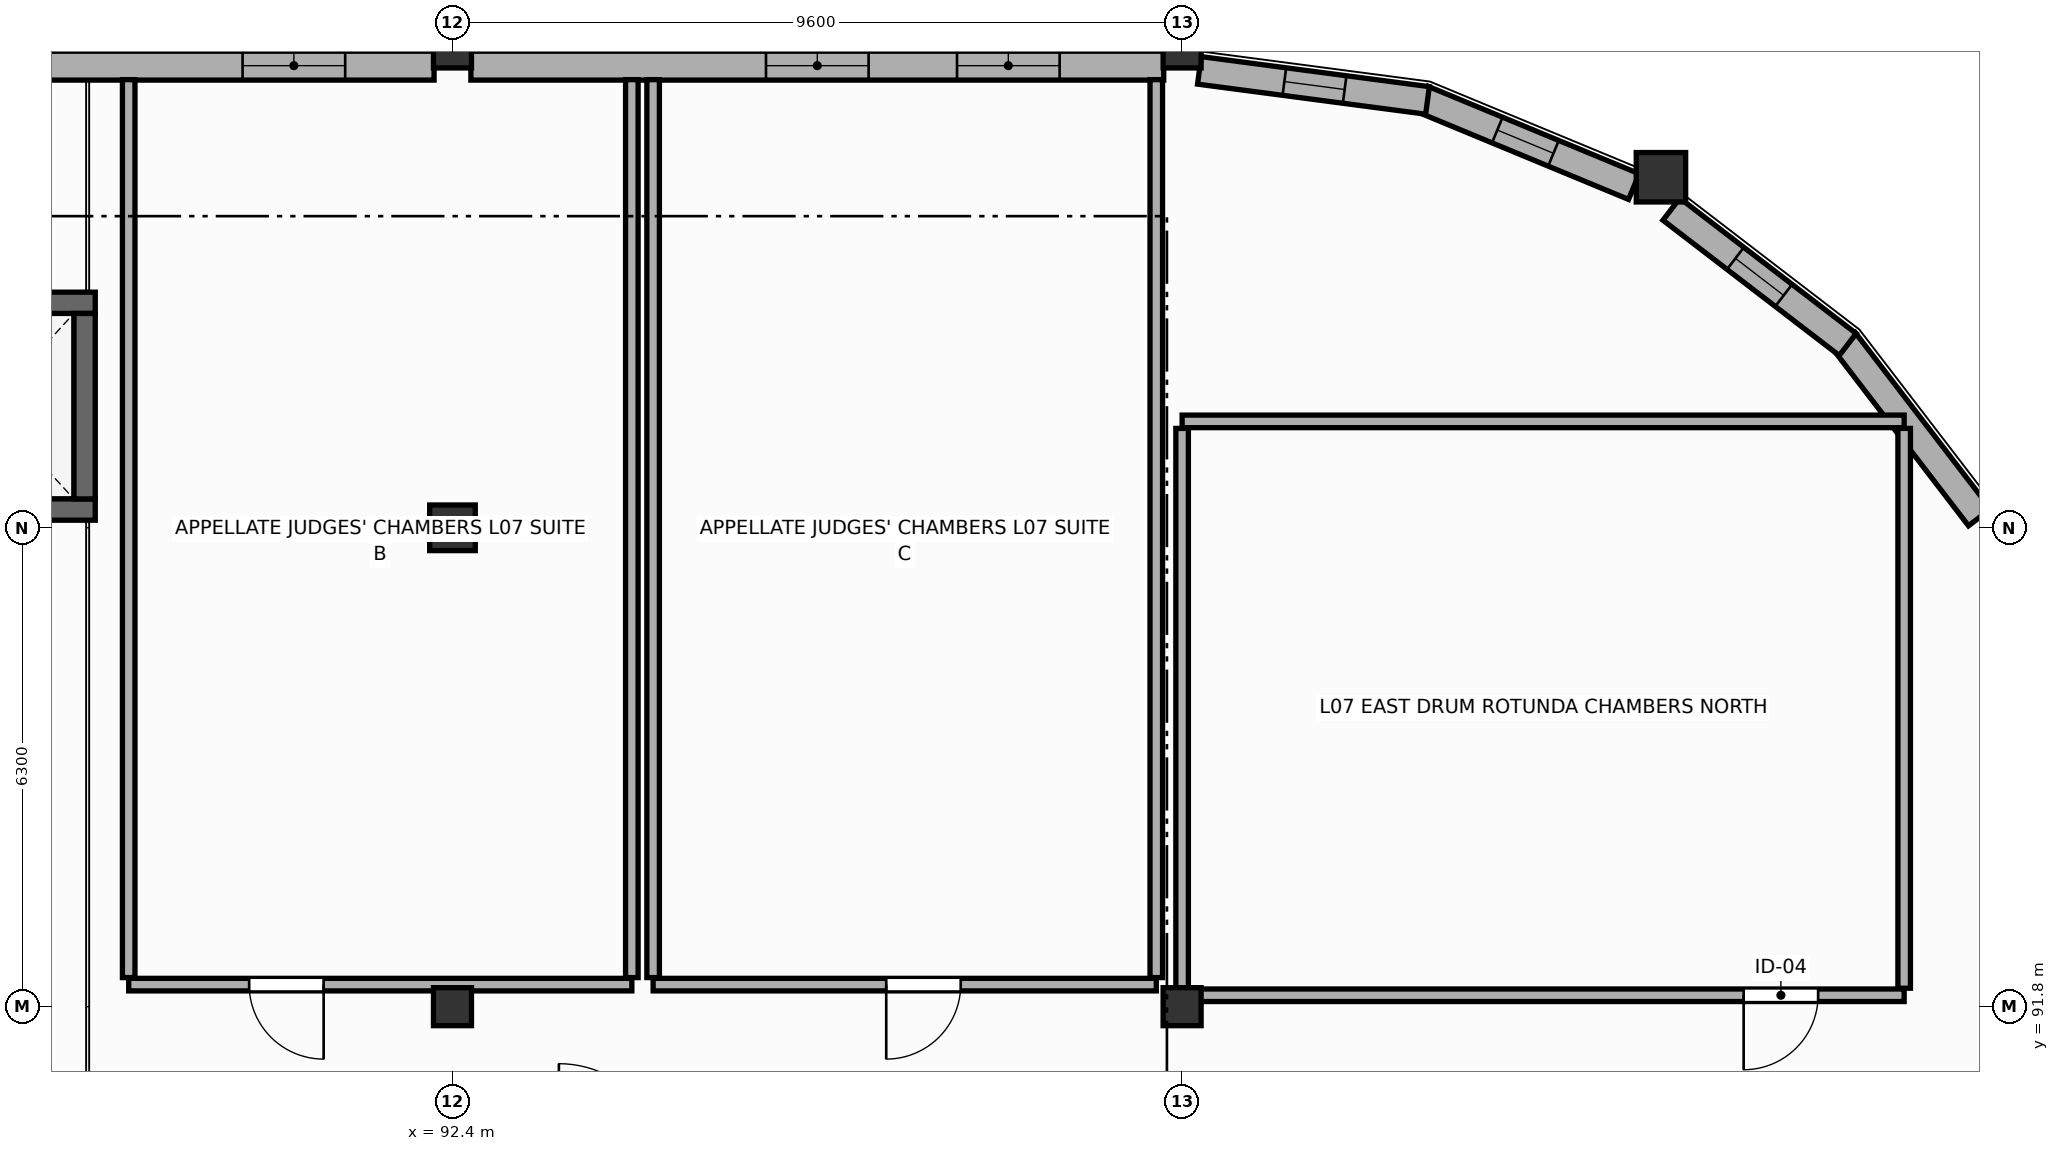
"""IFC4 building model, lengths in metres.
Left out: names, types, materials, properties, quantities, classifications, styles, units other than length and angle.
Written with IfcOpenShell. Run it as: python <this file> out.ifc"""

import sys

from ifc_helpers import new_model, si_unit, direction, frame, frame_2d, origin, origin_2d, place, context, subcontext, project, spatial, rectangle, circle, extrude, element, fill, save


model = new_model("IFC4")
c1 = context("Model", 3, precision=1e-05, world=origin(), true_north=direction((0.0, 1.0)))
c2 = subcontext(c1, "Body", "Model", "MODEL_VIEW")
j1 = project(units=[si_unit("LENGTHUNIT", "METRE"), si_unit("PLANEANGLEUNIT", "RADIAN")], contexts=[c1])
p1 = place(None, origin())
s1 = spatial("IfcSite", under=j1, at=p1, CompositionType="ELEMENT")
p2 = place(p1, origin())
s2 = spatial("IfcBuilding", under=s1, at=p2, CompositionType="ELEMENT")
p3 = place(p2, frame((0.0, 0.0, 27.0)))
s3 = spatial("IfcBuildingStorey", under=s2, at=p3, CompositionType="ELEMENT", Elevation=27.0)
for number, where, z_axis, x_axis in (
    (1, (92.4, 91.8, 0.0), (0.0, 0.0, 1.0), (1.0, 0.0, 0.0)),
    (2, (92.4, 104.4, 0.0), (0.0, 0.0, 1.0), (1.0, 0.0, 0.0)),
):
    element("IfcColumn", number, at=place(p3, frame(where, z_axis=z_axis, x_axis=x_axis)), inside=s3, PredefinedType="COLUMN", context=c2, shape_type="SweptSolid", body=[
        extrude(rectangle(XDim=0.5, YDim=0.5, at=origin_2d()), origin(), (0.0, 0.0, 1.0), 4.2),
    ])
p4 = place(p3, frame((92.4, 98.1, 0.0), z_axis=(0.0, 0.0, 1.0), x_axis=(1.0, 0.0, 0.0)))
e3 = element("IfcColumn", 3, at=p4, inside=s3, PredefinedType="COLUMN", context=c2, shape_type="SweptSolid", body=[
    extrude(rectangle(XDim=0.6, YDim=0.6, at=origin_2d()), origin(), (0.0, 0.0, 1.0), 4.2),
])
for number, where, z_axis, x_axis in (
    (4, (102.0, 91.8, 0.0), (0.0, 0.0, 1.0), (1.0, 0.0, 0.0)),
    (5, (102.0, 104.4, 0.0), (0.0, 0.0, 1.0), (1.0, 0.0, 0.0)),
):
    element("IfcColumn", number, at=place(p3, frame(where, z_axis=z_axis, x_axis=x_axis)), inside=s3, PredefinedType="COLUMN", context=c2, shape_type="SweptSolid", body=[
        extrude(rectangle(XDim=0.5, YDim=0.5, at=origin_2d()), origin(), (0.0, 0.0, 1.0), 4.2),
    ])
p5 = place(p3, frame((108.3, 102.712, 0.0), z_axis=(0.0, 0.0, 1.0), x_axis=(1.0, 0.0, 0.0)))
e6 = element("IfcColumn", 6, at=p5, inside=s3, PredefinedType="COLUMN", context=c2, shape_type="SweptSolid", body=[
    extrude(circle(Radius=0.325, at=origin_2d()), origin(), (0.0, 0.0, 1.0), 4.2),
])
p6 = place(p3, frame((84.242, 104.18, 0.0), z_axis=(0.0, 0.0, 1.0), x_axis=(1.0, 0.0, 0.0)))
e7 = element("IfcWall", 7, at=p6, inside=s3, PredefinedType="STANDARD", context=c2, shape_type="SweptSolid", body=[
    extrude(rectangle(XDim=7.916, YDim=0.38, at=frame_2d((3.958, 0.0))), origin(), (0.0, 0.0, 1.0), 3.11),
])
p7 = place(p6, frame((1.17, 0.0, 0.85)))
e8 = element("IfcOpeningElement", 8, at=p7, cuts=e7, PredefinedType="OPENING", context=c2, shape_type="SweptSolid", body=[
    extrude(rectangle(XDim=1.35, YDim=1.95, at=frame_2d((0.675, 0.975))), frame((0.0, 0.2, 0.0), z_axis=(0.0, -1.0, 0.0), x_axis=(1.0, 0.0, 0.0)), (0.0, 0.0, 1.0), 0.4),
])
p8 = place(p6, frame((5.396, 0.0, 0.85)))
e9 = element("IfcOpeningElement", 9, at=p8, cuts=e7, PredefinedType="OPENING", context=c2, shape_type="SweptSolid", body=[
    extrude(rectangle(XDim=1.35, YDim=1.95, at=frame_2d((0.675, 0.975))), frame((0.0, 0.2, 0.0), z_axis=(0.0, -1.0, 0.0), x_axis=(1.0, 0.0, 0.0)), (0.0, 0.0, 1.0), 0.4),
])
p9 = place(p3, frame((92.642, 104.18, 0.0), z_axis=(0.0, 0.0, 1.0), x_axis=(1.0, 0.0, 0.0)))
e10 = element("IfcWall", 10, at=p9, inside=s3, PredefinedType="STANDARD", context=c2, shape_type="SweptSolid", body=[
    extrude(rectangle(XDim=9.116, YDim=0.38, at=frame_2d((4.558, 0.0))), origin(), (0.0, 0.0, 1.0), 3.11),
])
p10 = place(p9, frame((3.883, 0.0, 0.85)))
e11 = element("IfcOpeningElement", 11, at=p10, cuts=e10, PredefinedType="OPENING", context=c2, shape_type="SweptSolid", body=[
    extrude(rectangle(XDim=1.35, YDim=1.95, at=frame_2d((0.675, 0.975))), frame((0.0, 0.2, 0.0), z_axis=(0.0, -1.0, 0.0), x_axis=(1.0, 0.0, 0.0)), (0.0, 0.0, 1.0), 0.4),
])
p11 = place(p9, frame((6.396, 0.0, 0.85)))
e12 = element("IfcOpeningElement", 12, at=p11, cuts=e10, PredefinedType="OPENING", context=c2, shape_type="SweptSolid", body=[
    extrude(rectangle(XDim=1.35, YDim=1.95, at=frame_2d((0.675, 0.975))), frame((0.0, 0.2, 0.0), z_axis=(0.0, -1.0, 0.0), x_axis=(1.0, 0.0, 0.0)), (0.0, 0.0, 1.0), 0.4),
])
p12 = place(p3, frame((112.491, 98.237, 0.0), z_axis=(0.0, 0.0, 1.0), x_axis=(-0.60876624393, 0.793349645649, 0.0)))
e13 = element("IfcWall", 13, at=p12, inside=s3, PredefinedType="ELEMENTEDWALL", context=c2, shape_type="SweptSolid", body=[
    extrude(rectangle(XDim=2.924, YDim=0.365, at=frame_2d((1.462, 0.0))), origin(), (0.0, 0.0, 1.0), 3.11),
])
p13 = place(p3, frame((110.757, 100.511, 0.0), z_axis=(0.0, 0.0, 1.0), x_axis=(-0.793318703663, 0.608806565682, 0.0)))
e14 = element("IfcWall", 14, at=p13, inside=s3, PredefinedType="ELEMENTEDWALL", context=c2, shape_type="SweptSolid", body=[
    extrude(rectangle(XDim=2.924, YDim=0.365, at=frame_2d((1.462, 0.0))), origin(), (0.0, 0.0, 1.0), 3.01),
])
p14 = place(p13, frame((1.062, 0.0, 0.85)))
e15 = element("IfcOpeningElement", 15, at=p14, cuts=e14, PredefinedType="OPENING", context=c2, shape_type="SweptSolid", body=[
    extrude(rectangle(XDim=0.8, YDim=1.7, at=frame_2d((0.4, 0.85))), frame((0.0, 0.192, 0.0), z_axis=(0.0, -1.0, 0.0), x_axis=(1.0, 0.0, 0.0)), (0.0, 0.0, 1.0), 0.385),
])
p15 = place(p3, frame((107.944, 102.589, 0.0), z_axis=(0.0, 0.0, 1.0), x_axis=(-0.923872366395, 0.382700732442, 0.0)))
e16 = element("IfcWall", 16, at=p15, inside=s3, PredefinedType="ELEMENTEDWALL", context=c2, shape_type="SweptSolid", body=[
    extrude(rectangle(XDim=3.007, YDim=0.365, at=frame_2d((1.504, 0.0))), origin(), (0.0, 0.0, 1.0), 3.01),
])
p16 = place(p15, frame((1.145, 0.0, 0.85)))
e17 = element("IfcOpeningElement", 17, at=p16, cuts=e16, PredefinedType="OPENING", context=c2, shape_type="SweptSolid", body=[
    extrude(rectangle(XDim=0.8, YDim=1.7, at=frame_2d((0.4, 0.85))), frame((0.0, 0.192, 0.0), z_axis=(0.0, -1.0, 0.0), x_axis=(1.0, 0.0, 0.0)), (0.0, 0.0, 1.0), 0.385),
])
p17 = place(p3, frame((105.229, 103.723, 0.0), z_axis=(0.0, 0.0, 1.0), x_axis=(-0.991450452257, 0.130483718216, 0.0)))
e18 = element("IfcWall", 18, at=p17, inside=s3, PredefinedType="ELEMENTEDWALL", context=c2, shape_type="SweptSolid", body=[
    extrude(rectangle(XDim=3.027, YDim=0.365, at=frame_2d((1.514, 0.0))), origin(), (0.0, 0.0, 1.0), 3.11),
])
p18 = place(p17, frame((1.1, 0.0, 0.85)))
e19 = element("IfcOpeningElement", 19, at=p18, cuts=e18, PredefinedType="OPENING", context=c2, shape_type="SweptSolid", body=[
    extrude(rectangle(XDim=0.8, YDim=1.7, at=frame_2d((0.4, 0.85))), frame((0.0, 0.192, 0.0), z_axis=(0.0, -1.0, 0.0), x_axis=(1.0, 0.0, 0.0)), (0.0, 0.0, 1.0), 0.385),
])
p19 = place(p3, frame((84.54, 101.06, 0.0), z_axis=(0.0, 0.0, 1.0), x_axis=(1.0, 0.0, 0.0)))
e20 = element("IfcWall", 20, at=p19, inside=s3, PredefinedType="SHEAR", context=c2, shape_type="SweptSolid", body=[
    extrude(rectangle(XDim=3.16, YDim=0.28, at=frame_2d((1.58, 0.0))), origin(), (0.0, 0.0, 1.0), 3.98),
])
p20 = place(p3, frame((87.7, 98.34, 0.0), z_axis=(0.0, 0.0, 1.0), x_axis=(-1.0, 0.0, 0.0)))
e21 = element("IfcWall", 21, at=p20, inside=s3, PredefinedType="SHEAR", context=c2, shape_type="SweptSolid", body=[
    extrude(rectangle(XDim=3.16, YDim=0.28, at=frame_2d((1.58, 0.0))), origin(), (0.0, 0.0, 1.0), 3.98),
])
p21 = place(p20, frame((0.925, 0.0, 0.0)))
e22 = element("IfcOpeningElement", 22, at=p21, cuts=e21, PredefinedType="OPENING", context=c2, shape_type="SweptSolid", body=[
    extrude(rectangle(XDim=0.95, YDim=2.15, at=frame_2d((0.475, 1.075))), frame((0.0, 0.15, 0.0), z_axis=(0.0, -1.0, 0.0), x_axis=(1.0, 0.0, 0.0)), (0.0, 0.0, 1.0), 0.3),
])
p22 = place(p3, frame((87.56, 100.92, 0.0), z_axis=(0.0, 0.0, 1.0), x_axis=(0.0, -1.0, 0.0)))
e23 = element("IfcWall", 23, at=p22, inside=s3, PredefinedType="SHEAR", context=c2, shape_type="SweptSolid", body=[
    extrude(rectangle(XDim=2.44, YDim=0.28, at=frame_2d((1.22, 0.0))), origin(), (0.0, 0.0, 1.0), 3.98),
])
p23 = place(p3, frame((94.76, 92.09, 0.0), z_axis=(0.0, 0.0, 1.0), x_axis=(-1.0, 0.0, 0.0)))
e24 = element("IfcWall", 24, at=p23, inside=s3, PredefinedType="PARTITIONING", context=c2, shape_type="SweptSolid", body=[
    extrude(rectangle(XDim=6.62, YDim=0.165, at=frame_2d((3.31, 0.0))), origin(), (0.0, 0.0, 1.0), 3.31),
])
p24 = place(p23, frame((4.055, 0.0, 0.0)))
e25 = element("IfcOpeningElement", 25, at=p24, cuts=e24, PredefinedType="OPENING", context=c2, shape_type="SweptSolid", body=[
    extrude(rectangle(XDim=0.98, YDim=2.2, at=frame_2d((0.49, 1.1))), frame((0.0, 0.093, 0.0), z_axis=(0.0, -1.0, 0.0), x_axis=(1.0, 0.0, 0.0)), (0.0, 0.0, 1.0), 0.185),
])
p25 = place(p3, frame((88.14, 92.183, 0.0), z_axis=(0.0, 0.0, 1.0), x_axis=(0.0, 1.0, 0.0)))
e26 = element("IfcWall", 26, at=p25, inside=s3, PredefinedType="PARTITIONING", context=c2, shape_type="SweptSolid", body=[
    extrude(rectangle(XDim=11.813, YDim=0.165, at=frame_2d((5.907, 0.0))), origin(), (0.0, 0.0, 1.0), 3.41),
])
p26 = place(p3, frame((94.76, 103.996, 0.0), z_axis=(0.0, 0.0, 1.0), x_axis=(0.0, -1.0, 0.0)))
e27 = element("IfcWall", 27, at=p26, inside=s3, PredefinedType="PARTITIONING", context=c2, shape_type="SweptSolid", body=[
    extrude(rectangle(XDim=11.813, YDim=0.165, at=frame_2d((5.907, 0.0))), origin(), (0.0, 0.0, 1.0), 3.31),
])
p27 = place(p3, frame((101.66, 92.09, 0.0), z_axis=(0.0, 0.0, 1.0), x_axis=(-1.0, 0.0, 0.0)))
e28 = element("IfcWall", 28, at=p27, inside=s3, PredefinedType="PARTITIONING", context=c2, shape_type="SweptSolid", body=[
    extrude(rectangle(XDim=6.62, YDim=0.165, at=frame_2d((3.31, 0.0))), origin(), (0.0, 0.0, 1.0), 3.11),
])
p28 = place(p27, frame((2.573, 0.0, 0.0)))
e29 = element("IfcOpeningElement", 29, at=p28, cuts=e28, PredefinedType="OPENING", context=c2, shape_type="SweptSolid", body=[
    extrude(rectangle(XDim=0.98, YDim=2.2, at=frame_2d((0.49, 1.1))), frame((0.0, 0.093, 0.0), z_axis=(0.0, -1.0, 0.0), x_axis=(1.0, 0.0, 0.0)), (0.0, 0.0, 1.0), 0.185),
])
p29 = place(p3, frame((95.04, 92.183, 0.0), z_axis=(0.0, 0.0, 1.0), x_axis=(0.0, 1.0, 0.0)))
e30 = element("IfcWall", 30, at=p29, inside=s3, PredefinedType="PARTITIONING", context=c2, shape_type="SweptSolid", body=[
    extrude(rectangle(XDim=11.813, YDim=0.165, at=frame_2d((5.907, 0.0))), origin(), (0.0, 0.0, 1.0), 3.31),
])
p30 = place(p3, frame((101.66, 103.996, 0.0), z_axis=(0.0, 0.0, 1.0), x_axis=(0.0, -1.0, 0.0)))
e31 = element("IfcWall", 31, at=p30, inside=s3, PredefinedType="PARTITIONING", context=c2, shape_type="SweptSolid", body=[
    extrude(rectangle(XDim=11.813, YDim=0.165, at=frame_2d((5.907, 0.0))), origin(), (0.0, 0.0, 1.0), 3.11),
])
p31 = place(p3, frame((102.0, 99.5, 0.0), z_axis=(0.0, 0.0, 1.0), x_axis=(1.0, 0.0, 0.0)))
e32 = element("IfcWall", 32, at=p31, inside=s3, PredefinedType="PARTITIONING", context=c2, shape_type="SweptSolid", body=[
    extrude(rectangle(XDim=9.5, YDim=0.165, at=frame_2d((4.75, 0.0))), origin(), (0.0, 0.0, 1.0), 3.01),
])
p32 = place(p3, frame((111.5, 91.95, 0.0), z_axis=(0.0, 0.0, 1.0), x_axis=(-1.0, 0.0, 0.0)))
e33 = element("IfcWall", 33, at=p32, inside=s3, PredefinedType="PARTITIONING", context=c2, shape_type="SweptSolid", body=[
    extrude(rectangle(XDim=9.5, YDim=0.165, at=frame_2d((4.75, 0.0))), origin(), (0.0, 0.0, 1.0), 3.01),
])
p33 = place(p32, frame((1.132, 0.0, 0.0)))
e34 = element("IfcOpeningElement", 34, at=p33, cuts=e33, PredefinedType="OPENING", context=c2, shape_type="SweptSolid", body=[
    extrude(rectangle(XDim=0.98, YDim=2.2, at=frame_2d((0.49, 1.1))), frame((0.0, 0.093, 0.0), z_axis=(0.0, -1.0, 0.0), x_axis=(1.0, 0.0, 0.0)), (0.0, 0.0, 1.0), 0.185),
])
for number, where, z_axis, x_axis in (
    (35, (102.0, 92.042, 0.0), (0.0, 0.0, 1.0), (0.0, 1.0, 0.0)),
    (36, (111.5, 99.407, 0.0), (0.0, 0.0, 1.0), (0.0, -1.0, 0.0)),
):
    element("IfcWall", number, at=place(p3, frame(where, z_axis=z_axis, x_axis=x_axis)), inside=s3, PredefinedType="PARTITIONING", context=c2, shape_type="SweptSolid", body=[
        extrude(rectangle(XDim=7.365, YDim=0.165, at=frame_2d((3.683, 0.0))), origin(), (0.0, 0.0, 1.0), 3.11),
    ])
p34 = place(p8, origin())
e37 = element("IfcWindow", 37, at=p34, inside=s3, PartitioningType="SINGLE_PANEL", PredefinedType="WINDOW", context=c2, shape_type="SweptSolid", body=[
    extrude(rectangle(XDim=1.35, YDim=1.95, at=frame_2d((0.675, 0.975))), frame((0.0, 0.03, 0.0), z_axis=(0.0, -1.0, 0.0), x_axis=(1.0, 0.0, 0.0)), (0.0, 0.0, 1.0), 0.06),
])
fill(e9, e37)
p35 = place(p10, origin())
e38 = element("IfcWindow", 38, at=p35, inside=s3, PartitioningType="SINGLE_PANEL", PredefinedType="WINDOW", context=c2, shape_type="SweptSolid", body=[
    extrude(rectangle(XDim=1.35, YDim=1.95, at=frame_2d((0.675, 0.975))), frame((0.0, 0.03, 0.0), z_axis=(0.0, -1.0, 0.0), x_axis=(1.0, 0.0, 0.0)), (0.0, 0.0, 1.0), 0.06),
])
fill(e11, e38)
p36 = place(p11, origin())
e39 = element("IfcWindow", 39, at=p36, inside=s3, PartitioningType="SINGLE_PANEL", PredefinedType="WINDOW", context=c2, shape_type="SweptSolid", body=[
    extrude(rectangle(XDim=1.35, YDim=1.95, at=frame_2d((0.675, 0.975))), frame((0.0, 0.03, 0.0), z_axis=(0.0, -1.0, 0.0), x_axis=(1.0, 0.0, 0.0)), (0.0, 0.0, 1.0), 0.06),
])
fill(e12, e39)
p37 = place(p14, origin())
e40 = element("IfcWindow", 40, at=p37, inside=s3, PartitioningType="SINGLE_PANEL", PredefinedType="WINDOW", context=c2, shape_type="SweptSolid", body=[
    extrude(rectangle(XDim=0.8, YDim=1.7, at=frame_2d((0.4, 0.85))), frame((0.0, 0.03, 0.0), z_axis=(0.0, -1.0, 0.0), x_axis=(1.0, 0.0, 0.0)), (0.0, 0.0, 1.0), 0.06),
])
fill(e15, e40)
p38 = place(p16, origin())
e41 = element("IfcWindow", 41, at=p38, inside=s3, PartitioningType="SINGLE_PANEL", PredefinedType="WINDOW", context=c2, shape_type="SweptSolid", body=[
    extrude(rectangle(XDim=0.8, YDim=1.7, at=frame_2d((0.4, 0.85))), frame((0.0, 0.03, 0.0), z_axis=(0.0, -1.0, 0.0), x_axis=(1.0, 0.0, 0.0)), (0.0, 0.0, 1.0), 0.06),
])
fill(e17, e41)
p39 = place(p18, origin())
e42 = element("IfcWindow", 42, at=p39, inside=s3, PartitioningType="SINGLE_PANEL", PredefinedType="WINDOW", context=c2, shape_type="SweptSolid", body=[
    extrude(rectangle(XDim=0.8, YDim=1.7, at=frame_2d((0.4, 0.85))), frame((0.0, 0.03, 0.0), z_axis=(0.0, -1.0, 0.0), x_axis=(1.0, 0.0, 0.0)), (0.0, 0.0, 1.0), 0.06),
])
fill(e19, e42)
p40 = place(p24, origin())
e43 = element("IfcDoor", 43, at=p40, inside=s3, OperationType="SINGLE_SWING_LEFT", PredefinedType="DOOR", context=c2, shape_type="SweptSolid", body=[
    extrude(rectangle(XDim=0.98, YDim=2.2, at=frame_2d((0.49, 1.1))), frame((0.0, 0.025, 0.0), z_axis=(0.0, -1.0, 0.0), x_axis=(1.0, 0.0, 0.0)), (0.0, 0.0, 1.0), 0.05),
])
fill(e25, e43)
p41 = place(p28, origin())
e44 = element("IfcDoor", 44, at=p41, inside=s3, OperationType="SINGLE_SWING_RIGHT", PredefinedType="DOOR", context=c2, shape_type="SweptSolid", body=[
    extrude(rectangle(XDim=0.98, YDim=2.2, at=frame_2d((0.49, 1.1))), frame((0.0, 0.025, 0.0), z_axis=(0.0, -1.0, 0.0), x_axis=(1.0, 0.0, 0.0)), (0.0, 0.0, 1.0), 0.05),
])
fill(e29, e44)
p42 = place(p33, origin())
e45 = element("IfcDoor", 45, at=p42, inside=s3, OperationType="SINGLE_SWING_RIGHT", PredefinedType="DOOR", context=c2, shape_type="SweptSolid", body=[
    extrude(rectangle(XDim=0.98, YDim=2.2, at=frame_2d((0.49, 1.1))), frame((0.0, 0.025, 0.0), z_axis=(0.0, -1.0, 0.0), x_axis=(1.0, 0.0, 0.0)), (0.0, 0.0, 1.0), 0.05),
])
fill(e34, e45)
save(model, sys.argv[1])
